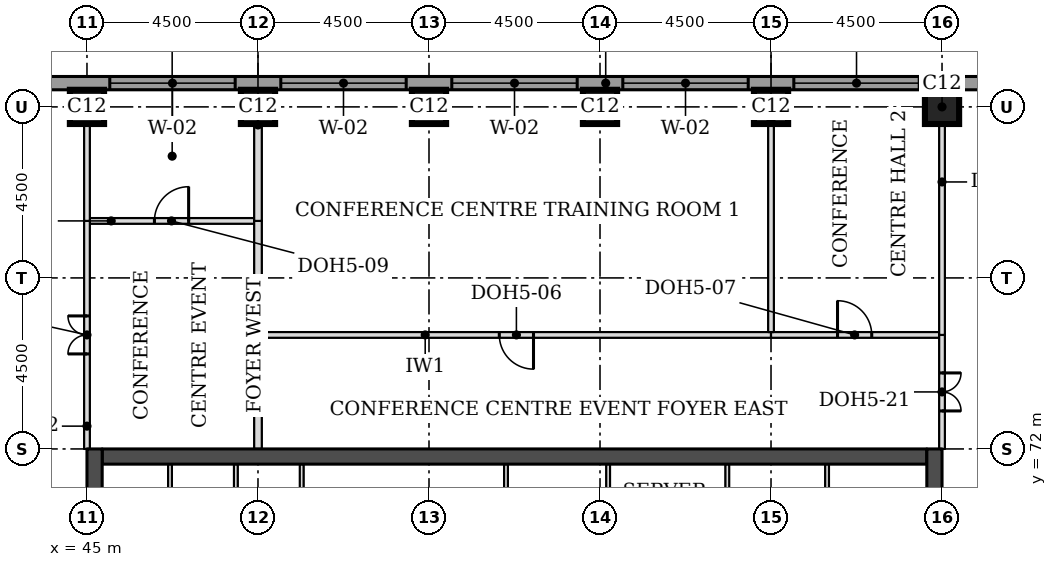
"""IFC4 building model, lengths in metres.
Left out: names, types, materials, properties, quantities, classifications, styles, units other than length and angle.
Written with IfcOpenShell. Run it as: python <this file> out.ifc"""

import sys

from ifc_helpers import new_model, si_unit, direction, frame, frame_2d, origin, origin_2d, place, context, subcontext, project, spatial, rectangle, extrude, element, fill, save


model = new_model("IFC4")
c1 = context("Model", 3, precision=1e-05, world=origin(), true_north=direction((0.0, 1.0)))
c2 = subcontext(c1, "Body", "Model", "MODEL_VIEW")
j1 = project(units=[si_unit("LENGTHUNIT", "METRE"), si_unit("PLANEANGLEUNIT", "RADIAN")], contexts=[c1])
p1 = place(None, origin())
s1 = spatial("IfcSite", under=j1, at=p1, CompositionType="ELEMENT")
p2 = place(p1, origin())
s2 = spatial("IfcBuilding", under=s1, at=p2, CompositionType="ELEMENT")
p3 = place(p2, frame((0.0, 0.0, 181.0)))
s3 = spatial("IfcBuildingStorey", under=s2, at=p3, CompositionType="ELEMENT", Elevation=181.0)
for number, where, z_axis, x_axis in (
    (1, (45.0, 81.0, 0.0), (0.0, 0.0, 1.0), (1.0, 0.0, 0.0)),
    (2, (49.5, 81.0, 0.0), (0.0, 0.0, 1.0), (1.0, 0.0, 0.0)),
    (3, (54.0, 81.0, 0.0), (0.0, 0.0, 1.0), (1.0, 0.0, 0.0)),
    (4, (58.5, 81.0, 0.0), (0.0, 0.0, 1.0), (1.0, 0.0, 0.0)),
    (5, (63.0, 81.0, 0.0), (0.0, 0.0, 1.0), (1.0, 0.0, 0.0)),
    (6, (67.5, 81.0, 0.0), (0.0, 0.0, 1.0), (1.0, 0.0, 0.0)),
):
    element("IfcColumn", number, at=place(p3, frame(where, z_axis=z_axis, x_axis=x_axis)), inside=s3, PredefinedType="COLUMN", context=c2, shape_type="SweptSolid", body=[
        extrude(rectangle(XDim=0.9, YDim=0.9, at=origin_2d()), origin(), (0.0, 0.0, 1.0), 3.7),
    ])
p4 = place(p3, frame((45.4, 71.8, 0.0), z_axis=(0.0, 0.0, 1.0), x_axis=(1.0, 0.0, 0.0)))
e7 = element("IfcWall", 7, at=p4, inside=s3, PredefinedType="SHEAR", context=c2, shape_type="SweptSolid", body=[
    extrude(rectangle(XDim=21.7, YDim=0.4, at=frame_2d((10.85, 0.0))), origin(), (0.0, 0.0, 1.0), 3.7),
])
p5 = place(p3, frame((45.2, 49.5, 0.0), z_axis=(0.0, 0.0, 1.0), x_axis=(0.0, 1.0, 0.0)))
e8 = element("IfcWall", 8, at=p5, inside=s3, PredefinedType="SHEAR", context=c2, shape_type="SweptSolid", body=[
    extrude(rectangle(XDim=22.5, YDim=0.4, at=frame_2d((11.25, 0.0))), origin(), (0.0, 0.0, 1.0), 3.7),
])
p6 = place(p5, frame((4.2, 0.0, 0.0)))
e9 = element("IfcOpeningElement", 9, at=p6, cuts=e8, PredefinedType="OPENING", context=c2, shape_type="SweptSolid", body=[
    extrude(rectangle(XDim=1.8, YDim=2.1, at=frame_2d((0.9, 1.05))), frame((0.0, 0.21, 0.0), z_axis=(0.0, -1.0, 0.0), x_axis=(1.0, 0.0, 0.0)), (0.0, 0.0, 1.0), 0.42),
])
p7 = place(p5, frame((6.9, 0.0, 0.0)))
e10 = element("IfcOpeningElement", 10, at=p7, cuts=e8, PredefinedType="OPENING", context=c2, shape_type="SweptSolid", body=[
    extrude(rectangle(XDim=1.1, YDim=2.1, at=frame_2d((0.55, 1.05))), frame((0.0, 0.21, 0.0), z_axis=(0.0, -1.0, 0.0), x_axis=(1.0, 0.0, 0.0)), (0.0, 0.0, 1.0), 0.42),
])
p8 = place(p5, frame((13.6, 0.0, 0.0)))
e11 = element("IfcOpeningElement", 11, at=p8, cuts=e8, PredefinedType="OPENING", context=c2, shape_type="SweptSolid", body=[
    extrude(rectangle(XDim=1.1, YDim=2.1, at=frame_2d((0.55, 1.05))), frame((0.0, 0.21, 0.0), z_axis=(0.0, -1.0, 0.0), x_axis=(1.0, 0.0, 0.0)), (0.0, 0.0, 1.0), 0.42),
])
p9 = place(p5, frame((16.5, 0.0, 0.0)))
e12 = element("IfcOpeningElement", 12, at=p9, cuts=e8, PredefinedType="OPENING", context=c2, shape_type="SweptSolid", body=[
    extrude(rectangle(XDim=1.8, YDim=2.1, at=frame_2d((0.9, 1.05))), frame((0.0, 0.21, 0.0), z_axis=(0.0, -1.0, 0.0), x_axis=(1.0, 0.0, 0.0)), (0.0, 0.0, 1.0), 0.42),
])
p10 = place(p3, frame((67.3, 49.5, 0.0), z_axis=(0.0, 0.0, 1.0), x_axis=(0.0, 1.0, 0.0)))
e13 = element("IfcWall", 13, at=p10, inside=s3, PredefinedType="SHEAR", context=c2, shape_type="SweptSolid", body=[
    extrude(rectangle(XDim=22.5, YDim=0.4, at=frame_2d((11.25, 0.0))), origin(), (0.0, 0.0, 1.0), 3.7),
])
p11 = place(p10, frame((4.2, 0.0, 0.0)))
e14 = element("IfcOpeningElement", 14, at=p11, cuts=e13, PredefinedType="OPENING", context=c2, shape_type="SweptSolid", body=[
    extrude(rectangle(XDim=1.8, YDim=2.1, at=frame_2d((0.9, 1.05))), frame((0.0, 0.21, 0.0), z_axis=(0.0, -1.0, 0.0), x_axis=(1.0, 0.0, 0.0)), (0.0, 0.0, 1.0), 0.42),
])
p12 = place(p10, frame((6.9, 0.0, 0.0)))
e15 = element("IfcOpeningElement", 15, at=p12, cuts=e13, PredefinedType="OPENING", context=c2, shape_type="SweptSolid", body=[
    extrude(rectangle(XDim=1.1, YDim=2.1, at=frame_2d((0.55, 1.05))), frame((0.0, 0.21, 0.0), z_axis=(0.0, -1.0, 0.0), x_axis=(1.0, 0.0, 0.0)), (0.0, 0.0, 1.0), 0.42),
])
p13 = place(p10, frame((13.6, 0.0, 0.0)))
e16 = element("IfcOpeningElement", 16, at=p13, cuts=e13, PredefinedType="OPENING", context=c2, shape_type="SweptSolid", body=[
    extrude(rectangle(XDim=1.1, YDim=2.1, at=frame_2d((0.55, 1.05))), frame((0.0, 0.21, 0.0), z_axis=(0.0, -1.0, 0.0), x_axis=(1.0, 0.0, 0.0)), (0.0, 0.0, 1.0), 0.42),
])
p14 = place(p10, frame((16.5, 0.0, 0.0)))
e17 = element("IfcOpeningElement", 17, at=p14, cuts=e13, PredefinedType="OPENING", context=c2, shape_type="SweptSolid", body=[
    extrude(rectangle(XDim=1.8, YDim=2.1, at=frame_2d((0.9, 1.05))), frame((0.0, 0.21, 0.0), z_axis=(0.0, -1.0, 0.0), x_axis=(1.0, 0.0, 0.0)), (0.0, 0.0, 1.0), 0.42),
])
p15 = place(p3, frame((72.331, 81.625, 0.0), z_axis=(0.0, 0.0, 1.0), x_axis=(-1.0, 0.0, 0.0)))
e18 = element("IfcWall", 18, at=p15, inside=s3, PredefinedType="STANDARD", context=c2, shape_type="SweptSolid", body=[
    extrude(rectangle(XDim=32.163, YDim=0.35, at=frame_2d((16.081, 0.0))), origin(), (0.0, 0.0, 1.0), 3.525),
])
p16 = place(p15, frame((5.431, 0.0, 0.9)))
e19 = element("IfcOpeningElement", 19, at=p16, cuts=e18, PredefinedType="OPENING", context=c2, shape_type="SweptSolid", body=[
    extrude(rectangle(XDim=3.3, YDim=1.9, at=frame_2d((1.65, 0.95))), frame((0.0, 0.185, 0.0), z_axis=(0.0, -1.0, 0.0), x_axis=(1.0, 0.0, 0.0)), (0.0, 0.0, 1.0), 0.37),
])
p17 = place(p15, frame((9.931, 0.0, 0.9)))
e20 = element("IfcOpeningElement", 20, at=p17, cuts=e18, PredefinedType="OPENING", context=c2, shape_type="SweptSolid", body=[
    extrude(rectangle(XDim=3.3, YDim=1.9, at=frame_2d((1.65, 0.95))), frame((0.0, 0.185, 0.0), z_axis=(0.0, -1.0, 0.0), x_axis=(1.0, 0.0, 0.0)), (0.0, 0.0, 1.0), 0.37),
])
p18 = place(p15, frame((14.431, 0.0, 0.9)))
e21 = element("IfcOpeningElement", 21, at=p18, cuts=e18, PredefinedType="OPENING", context=c2, shape_type="SweptSolid", body=[
    extrude(rectangle(XDim=3.3, YDim=1.9, at=frame_2d((1.65, 0.95))), frame((0.0, 0.185, 0.0), z_axis=(0.0, -1.0, 0.0), x_axis=(1.0, 0.0, 0.0)), (0.0, 0.0, 1.0), 0.37),
])
p19 = place(p15, frame((18.931, 0.0, 0.9)))
e22 = element("IfcOpeningElement", 22, at=p19, cuts=e18, PredefinedType="OPENING", context=c2, shape_type="SweptSolid", body=[
    extrude(rectangle(XDim=3.3, YDim=1.9, at=frame_2d((1.65, 0.95))), frame((0.0, 0.185, 0.0), z_axis=(0.0, -1.0, 0.0), x_axis=(1.0, 0.0, 0.0)), (0.0, 0.0, 1.0), 0.37),
])
p20 = place(p15, frame((23.431, 0.0, 0.9)))
e23 = element("IfcOpeningElement", 23, at=p20, cuts=e18, PredefinedType="OPENING", context=c2, shape_type="SweptSolid", body=[
    extrude(rectangle(XDim=3.3, YDim=1.9, at=frame_2d((1.65, 0.95))), frame((0.0, 0.185, 0.0), z_axis=(0.0, -1.0, 0.0), x_axis=(1.0, 0.0, 0.0)), (0.0, 0.0, 1.0), 0.37),
])
p21 = place(p3, frame((49.6, 75.0, 0.0), z_axis=(0.0, 0.0, 1.0), x_axis=(1.0, 0.0, 0.0)))
e24 = element("IfcWall", 24, at=p21, inside=s3, PredefinedType="PARTITIONING", context=c2, shape_type="SweptSolid", body=[
    extrude(rectangle(XDim=13.4, YDim=0.15, at=frame_2d((6.7, 0.0))), origin(), (0.0, 0.0, 1.0), 3.55),
])
p22 = place(p21, frame((6.25, 0.0, 0.0)))
e25 = element("IfcOpeningElement", 25, at=p22, cuts=e24, PredefinedType="OPENING", context=c2, shape_type="SweptSolid", body=[
    extrude(rectangle(XDim=0.9, YDim=2.1, at=frame_2d((0.45, 1.05))), frame((0.0, 0.085, 0.0), z_axis=(0.0, -1.0, 0.0), x_axis=(1.0, 0.0, 0.0)), (0.0, 0.0, 1.0), 0.17),
])
p23 = place(p3, frame((63.0, 75.0, 0.0), z_axis=(0.0, 0.0, 1.0), x_axis=(1.0, 0.0, 0.0)))
e26 = element("IfcWall", 26, at=p23, inside=s3, PredefinedType="PARTITIONING", context=c2, shape_type="SweptSolid", body=[
    extrude(rectangle(XDim=4.425, YDim=0.15, at=frame_2d((2.212, 0.0))), origin(), (0.0, 0.0, 1.0), 3.55),
])
p24 = place(p23, frame((1.75, 0.0, 0.0)))
e27 = element("IfcOpeningElement", 27, at=p24, cuts=e26, PredefinedType="OPENING", context=c2, shape_type="SweptSolid", body=[
    extrude(rectangle(XDim=0.9, YDim=2.1, at=frame_2d((0.45, 1.05))), frame((0.0, 0.085, 0.0), z_axis=(0.0, -1.0, 0.0), x_axis=(1.0, 0.0, 0.0)), (0.0, 0.0, 1.0), 0.17),
])
p25 = place(p3, frame((45.075, 78.0, 0.0), z_axis=(0.0, 0.0, 1.0), x_axis=(1.0, 0.0, 0.0)))
e28 = element("IfcWall", 28, at=p25, inside=s3, PredefinedType="PARTITIONING", context=c2, shape_type="SweptSolid", body=[
    extrude(rectangle(XDim=4.325, YDim=0.15, at=frame_2d((2.163, 0.0))), origin(), (0.0, 0.0, 1.0), 3.55),
])
p26 = place(p25, frame((1.7, 0.0, 0.0)))
e29 = element("IfcOpeningElement", 29, at=p26, cuts=e28, PredefinedType="OPENING", context=c2, shape_type="SweptSolid", body=[
    extrude(rectangle(XDim=0.9, YDim=2.1, at=frame_2d((0.45, 1.05))), frame((0.0, 0.085, 0.0), z_axis=(0.0, -1.0, 0.0), x_axis=(1.0, 0.0, 0.0)), (0.0, 0.0, 1.0), 0.17),
])
p27 = place(p3, frame((45.0, 72.0, 0.0), z_axis=(0.0, 0.0, 1.0), x_axis=(0.0, 1.0, 0.0)))
e30 = element("IfcWall", 30, at=p27, inside=s3, PredefinedType="PARTITIONING", context=c2, shape_type="SweptSolid", body=[
    extrude(rectangle(XDim=6.0, YDim=0.15, at=frame_2d((3.0, 0.0))), origin(), (0.0, 0.0, 1.0), 3.022),
])
p28 = place(p27, frame((2.5, 0.0, 0.0)))
e31 = element("IfcOpeningElement", 31, at=p28, cuts=e30, PredefinedType="OPENING", context=c2, shape_type="SweptSolid", body=[
    extrude(rectangle(XDim=1.0, YDim=2.1, at=frame_2d((0.5, 1.05))), frame((0.0, 0.085, 0.0), z_axis=(0.0, -1.0, 0.0), x_axis=(1.0, 0.0, 0.0)), (0.0, 0.0, 1.0), 0.17),
])
p29 = place(p3, frame((49.5, 72.0, 0.0), z_axis=(0.0, 0.0, 1.0), x_axis=(0.0, 1.0, 0.0)))
e32 = element("IfcWall", 32, at=p29, inside=s3, PredefinedType="PARTITIONING", context=c2, shape_type="SweptSolid", body=[
    extrude(rectangle(XDim=3.0, YDim=0.2, at=frame_2d((1.5, 0.0))), origin(), (0.0, 0.0, 1.0), 3.55),
])
p30 = place(p3, frame((67.5, 72.0, 0.0), z_axis=(0.0, 0.0, 1.0), x_axis=(0.0, 1.0, 0.0)))
e33 = element("IfcWall", 33, at=p30, inside=s3, PredefinedType="PARTITIONING", context=c2, shape_type="SweptSolid", body=[
    extrude(rectangle(XDim=3.0, YDim=0.15, at=frame_2d((1.5, 0.0))), origin(), (0.0, 0.0, 1.0), 3.022),
])
p31 = place(p30, frame((1.0, 0.0, 0.0)))
e34 = element("IfcOpeningElement", 34, at=p31, cuts=e33, PredefinedType="OPENING", context=c2, shape_type="SweptSolid", body=[
    extrude(rectangle(XDim=1.0, YDim=2.1, at=frame_2d((0.5, 1.05))), frame((0.0, 0.085, 0.0), z_axis=(0.0, -1.0, 0.0), x_axis=(1.0, 0.0, 0.0)), (0.0, 0.0, 1.0), 0.17),
])
p32 = place(p3, frame((49.5, 75.0, 0.0), z_axis=(0.0, 0.0, 1.0), x_axis=(0.0, 1.0, 0.0)))
e35 = element("IfcWall", 35, at=p32, inside=s3, PredefinedType="PARTITIONING", context=c2, shape_type="SweptSolid", body=[
    extrude(rectangle(XDim=3.0, YDim=0.2, at=frame_2d((1.5, 0.0))), origin(), (0.0, 0.0, 1.0), 3.55),
])
p33 = place(p3, frame((67.5, 75.0, 0.0), z_axis=(0.0, 0.0, 1.0), x_axis=(0.0, 1.0, 0.0)))
e36 = element("IfcWall", 36, at=p33, inside=s3, PredefinedType="PARTITIONING", context=c2, shape_type="SweptSolid", body=[
    extrude(rectangle(XDim=6.45, YDim=0.15, at=frame_2d((3.225, 0.0))), origin(), (0.0, 0.0, 1.0), 3.022),
])
p34 = place(p3, frame((63.0, 75.075, 0.0), z_axis=(0.0, 0.0, 1.0), x_axis=(0.0, 1.0, 0.0)))
e37 = element("IfcWall", 37, at=p34, inside=s3, PredefinedType="PARTITIONING", context=c2, shape_type="SweptSolid", body=[
    extrude(rectangle(XDim=6.375, YDim=0.15, at=frame_2d((3.188, 0.0))), origin(), (0.0, 0.0, 1.0), 3.55),
])
p35 = place(p3, frame((45.0, 78.0, 0.0), z_axis=(0.0, 0.0, 1.0), x_axis=(0.0, 1.0, 0.0)))
e38 = element("IfcWall", 38, at=p35, inside=s3, PredefinedType="PARTITIONING", context=c2, shape_type="SweptSolid", body=[
    extrude(rectangle(XDim=3.45, YDim=0.15, at=frame_2d((1.725, 0.0))), origin(), (0.0, 0.0, 1.0), 3.022),
])
p36 = place(p3, frame((49.5, 78.0, 0.0), z_axis=(0.0, 0.0, 1.0), x_axis=(0.0, 1.0, 0.0)))
e39 = element("IfcWall", 39, at=p36, inside=s3, PredefinedType="PARTITIONING", context=c2, shape_type="SweptSolid", body=[
    extrude(rectangle(XDim=3.45, YDim=0.2, at=frame_2d((1.725, 0.0))), origin(), (0.0, 0.0, 1.0), 3.55),
])
for number, where, z_axis, x_axis in (
    (40, (47.185, 68.5, 0.0), (0.0, 0.0, 1.0), (0.0, 1.0, 0.0)),
    (41, (48.917, 68.5, 0.0), (0.0, 0.0, 1.0), (0.0, 1.0, 0.0)),
    (42, (50.65, 68.5, 0.0), (0.0, 0.0, 1.0), (0.0, 1.0, 0.0)),
    (43, (56.026, 68.5, 0.0), (0.0, 0.0, 1.0), (0.0, 1.0, 0.0)),
    (44, (58.714, 68.5, 0.0), (0.0, 0.0, 1.0), (0.0, 1.0, 0.0)),
    (45, (61.85, 68.5, 0.0), (0.0, 0.0, 1.0), (0.0, 1.0, 0.0)),
    (46, (64.475, 68.5, 0.0), (0.0, 0.0, 1.0), (0.0, 1.0, 0.0)),
):
    element("IfcWall", number, at=place(p3, frame(where, z_axis=z_axis, x_axis=x_axis)), inside=s3, PredefinedType="PARTITIONING", context=c2, shape_type="SweptSolid", body=[
        extrude(rectangle(XDim=3.1, YDim=0.1, at=frame_2d((1.55, 0.0))), origin(), (0.0, 0.0, 1.0), 3.55),
    ])
p37 = place(p16, origin())
e47 = element("IfcWindow", 47, at=p37, inside=s3, PartitioningType="SINGLE_PANEL", PredefinedType="WINDOW", context=c2, shape_type="SweptSolid", body=[
    extrude(rectangle(XDim=3.3, YDim=1.9, at=frame_2d((1.65, 0.95))), frame((0.0, 0.085, 0.0), z_axis=(0.0, -1.0, 0.0), x_axis=(1.0, 0.0, 0.0)), (0.0, 0.0, 1.0), 0.06),
])
fill(e19, e47)
p38 = place(p17, origin())
e48 = element("IfcWindow", 48, at=p38, inside=s3, PartitioningType="SINGLE_PANEL", PredefinedType="WINDOW", context=c2, shape_type="SweptSolid", body=[
    extrude(rectangle(XDim=3.3, YDim=1.9, at=frame_2d((1.65, 0.95))), frame((0.0, 0.085, 0.0), z_axis=(0.0, -1.0, 0.0), x_axis=(1.0, 0.0, 0.0)), (0.0, 0.0, 1.0), 0.06),
])
fill(e20, e48)
p39 = place(p18, origin())
e49 = element("IfcWindow", 49, at=p39, inside=s3, PartitioningType="SINGLE_PANEL", PredefinedType="WINDOW", context=c2, shape_type="SweptSolid", body=[
    extrude(rectangle(XDim=3.3, YDim=1.9, at=frame_2d((1.65, 0.95))), frame((0.0, 0.085, 0.0), z_axis=(0.0, -1.0, 0.0), x_axis=(1.0, 0.0, 0.0)), (0.0, 0.0, 1.0), 0.06),
])
fill(e21, e49)
p40 = place(p19, origin())
e50 = element("IfcWindow", 50, at=p40, inside=s3, PartitioningType="SINGLE_PANEL", PredefinedType="WINDOW", context=c2, shape_type="SweptSolid", body=[
    extrude(rectangle(XDim=3.3, YDim=1.9, at=frame_2d((1.65, 0.95))), frame((0.0, 0.085, 0.0), z_axis=(0.0, -1.0, 0.0), x_axis=(1.0, 0.0, 0.0)), (0.0, 0.0, 1.0), 0.06),
])
fill(e22, e50)
p41 = place(p20, origin())
e51 = element("IfcWindow", 51, at=p41, inside=s3, PartitioningType="SINGLE_PANEL", PredefinedType="WINDOW", context=c2, shape_type="SweptSolid", body=[
    extrude(rectangle(XDim=3.3, YDim=1.9, at=frame_2d((1.65, 0.95))), frame((0.0, 0.085, 0.0), z_axis=(0.0, -1.0, 0.0), x_axis=(1.0, 0.0, 0.0)), (0.0, 0.0, 1.0), 0.06),
])
fill(e23, e51)
p42 = place(p28, origin())
e52 = element("IfcDoor", 52, at=p42, inside=s3, OperationType="DOUBLE_DOOR_SINGLE_SWING", PredefinedType="DOOR", context=c2, shape_type="SweptSolid", body=[
    extrude(rectangle(XDim=1.0, YDim=2.1, at=frame_2d((0.5, 1.05))), frame((0.0, 0.025, 0.0), z_axis=(0.0, -1.0, 0.0), x_axis=(1.0, 0.0, 0.0)), (0.0, 0.0, 1.0), 0.05),
])
fill(e31, e52)
p43 = place(p26, origin())
e53 = element("IfcDoor", 53, at=p43, inside=s3, OperationType="SINGLE_SWING_RIGHT", PredefinedType="DOOR", context=c2, shape_type="SweptSolid", body=[
    extrude(rectangle(XDim=0.9, YDim=2.1, at=frame_2d((0.45, 1.05))), frame((0.0, 0.025, 0.0), z_axis=(0.0, -1.0, 0.0), x_axis=(1.0, 0.0, 0.0)), (0.0, 0.0, 1.0), 0.05),
])
fill(e29, e53)
p44 = place(p31, frame((1.0, 0.0, 0.0), z_axis=(0.0, 0.0, 1.0), x_axis=(-1.0, 0.0, 0.0)))
e54 = element("IfcDoor", 54, at=p44, inside=s3, OperationType="DOUBLE_DOOR_SINGLE_SWING", PredefinedType="DOOR", context=c2, shape_type="SweptSolid", body=[
    extrude(rectangle(XDim=1.0, YDim=2.1, at=frame_2d((0.5, 1.05))), frame((0.0, 0.025, 0.0), z_axis=(0.0, -1.0, 0.0), x_axis=(1.0, 0.0, 0.0)), (0.0, 0.0, 1.0), 0.05),
])
fill(e34, e54)
p45 = place(p22, frame((0.9, 0.0, 0.0), z_axis=(0.0, 0.0, 1.0), x_axis=(-1.0, 0.0, 0.0)))
e55 = element("IfcDoor", 55, at=p45, inside=s3, OperationType="SINGLE_SWING_LEFT", PredefinedType="DOOR", context=c2, shape_type="SweptSolid", body=[
    extrude(rectangle(XDim=0.9, YDim=2.1, at=frame_2d((0.45, 1.05))), frame((0.0, 0.025, 0.0), z_axis=(0.0, -1.0, 0.0), x_axis=(1.0, 0.0, 0.0)), (0.0, 0.0, 1.0), 0.05),
])
fill(e25, e55)
p46 = place(p24, origin())
e56 = element("IfcDoor", 56, at=p46, inside=s3, OperationType="SINGLE_SWING_LEFT", PredefinedType="DOOR", context=c2, shape_type="SweptSolid", body=[
    extrude(rectangle(XDim=0.9, YDim=2.1, at=frame_2d((0.45, 1.05))), frame((0.0, 0.025, 0.0), z_axis=(0.0, -1.0, 0.0), x_axis=(1.0, 0.0, 0.0)), (0.0, 0.0, 1.0), 0.05),
])
fill(e27, e56)
save(model, sys.argv[1])
